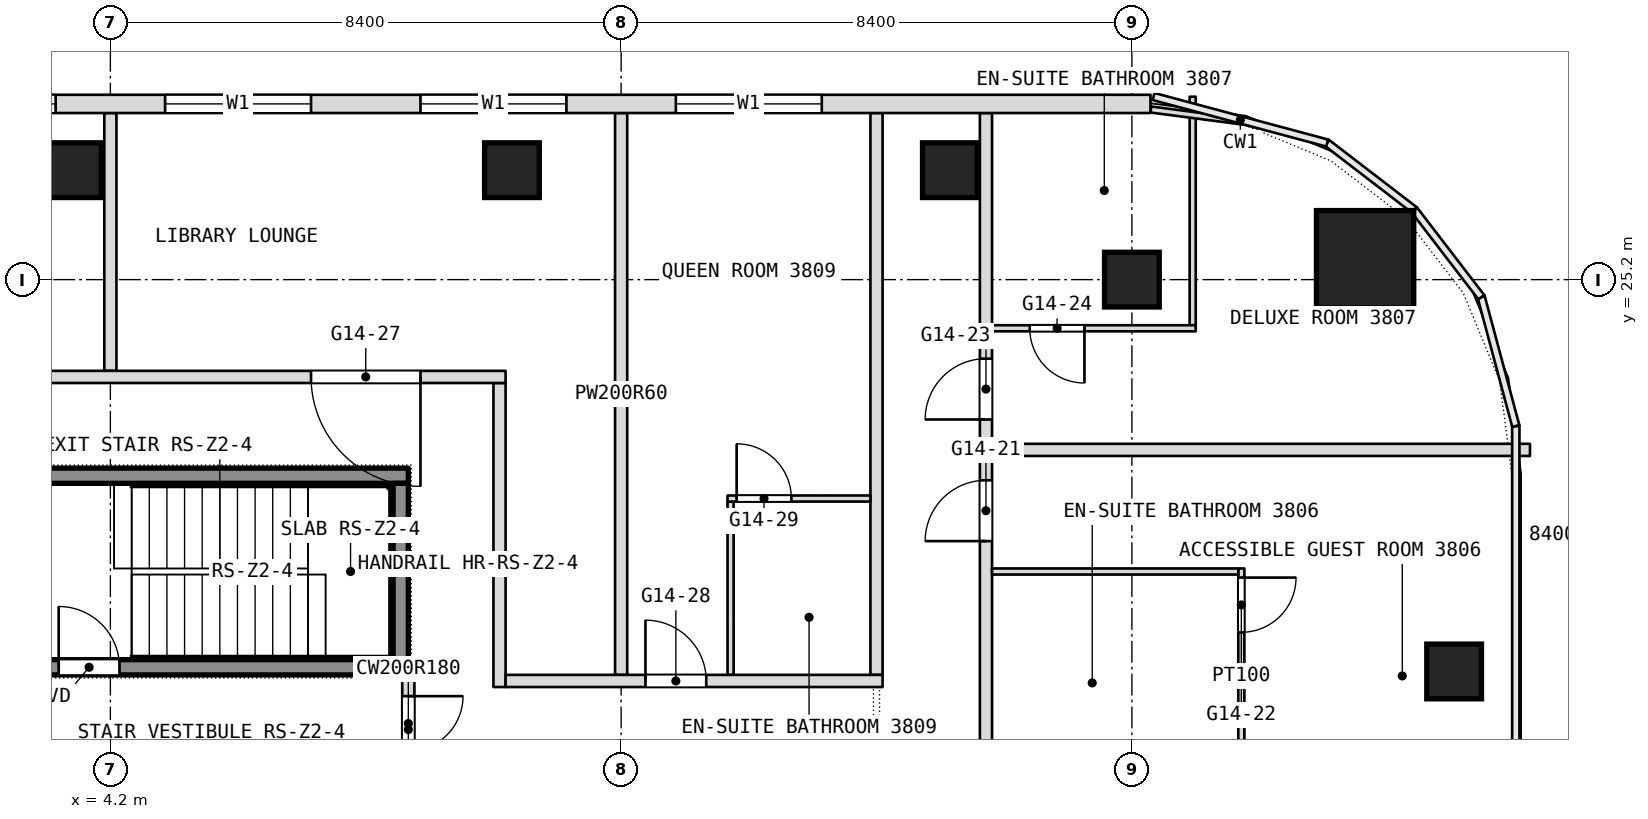
"""IFC4 building model, lengths in metres.
Left out: names, types, materials, properties, quantities, classifications, styles, units other than length and angle.
Written with IfcOpenShell. Run it as: python <this file> out.ifc"""

import sys

from ifc_helpers import new_model, si_unit, direction, frame, frame_2d, origin, origin_2d, place, context, subcontext, project, spatial, rectangle, extrude, element, fill, save


model = new_model("IFC4")
c1 = context("Model", 3, precision=1e-05, world=origin(), true_north=direction((0.0, 1.0)))
c2 = subcontext(c1, "Body", "Model", "MODEL_VIEW")
j1 = project(units=[si_unit("LENGTHUNIT", "METRE"), si_unit("PLANEANGLEUNIT", "RADIAN")], contexts=[c1])
p1 = place(None, origin())
s1 = spatial("IfcSite", under=j1, at=p1, CompositionType="ELEMENT")
p2 = place(p1, origin())
s2 = spatial("IfcBuilding", under=s1, at=p2, CompositionType="ELEMENT")
p3 = place(p2, frame((0.0, 0.0, 162.5)))
s3 = spatial("IfcBuildingStorey", under=s2, at=p3, CompositionType="ELEMENT", Elevation=162.5)
p4 = place(p3, frame((24.835, 25.535, 0.0), z_axis=(0.0, 0.0, 1.0), x_axis=(1.0, 0.0, 0.0)))
e1 = element("IfcColumn", 1, at=p4, inside=s3, PredefinedType="COLUMN", context=c2, shape_type="SweptSolid", body=[
    extrude(rectangle(XDim=1.6, YDim=1.6, at=origin_2d()), origin(), (0.0, 0.0, 1.0), 3.6),
])
for number, where, z_axis, x_axis in (
    (2, (21.0, 25.2, 0.0), (0.0, 0.0, 1.0), (1.0, 0.0, 0.0)),
    (3, (3.601, 27.0, 0.0), (0.0, 0.0, 1.0), (1.0, 0.0, 0.0)),
    (4, (10.804, 27.0, 0.0), (0.0, 0.0, 1.0), (1.0, 0.0, 0.0)),
    (5, (18.007, 27.0, 0.0), (0.0, 0.0, 1.0), (1.0, 0.0, 0.0)),
    (6, (26.3, 18.756, 0.0), (0.0, 0.0, 1.0), (1.0, 0.0, 0.0)),
):
    element("IfcColumn", number, at=place(p3, frame(where, z_axis=z_axis, x_axis=x_axis)), inside=s3, PredefinedType="COLUMN", context=c2, shape_type="SweptSolid", body=[
        extrude(rectangle(XDim=0.9, YDim=0.9, at=origin_2d()), origin(), (0.0, 0.0, 1.0), 3.6),
    ])
p5 = place(p3, frame((22.8, 16.9, 0.0), z_axis=(0.0, 0.0, 1.0), x_axis=(0.0, 1.0, 0.0)))
e7 = element("IfcWall", 7, at=p5, inside=s3, PredefinedType="PARTITIONING", context=c2, shape_type="SweptSolid", body=[
    extrude(rectangle(XDim=3.55, YDim=0.1, at=frame_2d((1.775, 0.0))), origin(), (0.0, 0.0, 1.0), 3.34),
])
p6 = place(p5, frame((2.5, 0.0, 0.0)))
e8 = element("IfcOpeningElement", 8, at=p6, cuts=e7, PredefinedType="OPENING", context=c2, shape_type="SweptSolid", body=[
    extrude(rectangle(XDim=0.9, YDim=2.1, at=frame_2d((0.45, 1.05))), frame((0.0, 0.05, 0.0), z_axis=(0.0, -1.0, 0.0), x_axis=(1.0, 0.0, 0.0)), (0.0, 0.0, 1.0), 0.1),
])
p7 = place(p3, frame((22.0, 24.45, 0.0), z_axis=(0.0, 0.0, 1.0), x_axis=(0.0, 1.0, 0.0)))
e9 = element("IfcWall", 9, at=p7, inside=s3, PredefinedType="PARTITIONING", context=c2, shape_type="SweptSolid", body=[
    extrude(rectangle(XDim=3.758, YDim=0.1, at=frame_2d((1.879, 0.0))), origin(), (0.0, 0.0, 1.0), 3.34),
])
p8 = place(p3, frame((18.6, -21.708, 0.0), z_axis=(0.0, 0.0, 1.0), x_axis=(0.0, 1.0, 0.0)))
e10 = element("IfcWall", 10, at=p8, inside=s3, PredefinedType="PARTITIONING", context=c2, shape_type="SweptSolid", body=[
    extrude(rectangle(XDim=49.648, YDim=0.2, at=frame_2d((24.824, 0.0))), origin(), (0.0, 0.0, 1.0), 3.34),
])
p9 = place(p8, frame((2.204, 0.0, 0.0)))
e11 = element("IfcOpeningElement", 11, at=p9, cuts=e10, PredefinedType="OPENING", context=c2, shape_type="SweptSolid", body=[
    extrude(rectangle(XDim=0.9, YDim=2.1, at=frame_2d((0.45, 1.05))), frame((0.0, 0.1, 0.0), z_axis=(0.0, -1.0, 0.0), x_axis=(1.0, 0.0, 0.0)), (0.0, 0.0, 1.0), 0.2),
])
p10 = place(p8, frame((8.608, 0.0, 0.0)))
e12 = element("IfcOpeningElement", 12, at=p10, cuts=e10, PredefinedType="OPENING", context=c2, shape_type="SweptSolid", body=[
    extrude(rectangle(XDim=1.1, YDim=2.1, at=frame_2d((0.55, 1.05))), frame((0.0, 0.1, 0.0), z_axis=(0.0, -1.0, 0.0), x_axis=(1.0, 0.0, 0.0)), (0.0, 0.0, 1.0), 0.2),
])
p11 = place(p8, frame((16.608, 0.0, 0.0)))
e13 = element("IfcOpeningElement", 13, at=p11, cuts=e10, PredefinedType="OPENING", context=c2, shape_type="SweptSolid", body=[
    extrude(rectangle(XDim=1.8, YDim=2.1, at=frame_2d((0.9, 1.05))), frame((0.0, 0.1, 0.0), z_axis=(0.0, -1.0, 0.0), x_axis=(1.0, 0.0, 0.0)), (0.0, 0.0, 1.0), 0.2),
])
p12 = place(p8, frame((27.458, 0.0, 0.0)))
e14 = element("IfcOpeningElement", 14, at=p12, cuts=e10, PredefinedType="OPENING", context=c2, shape_type="SweptSolid", body=[
    extrude(rectangle(XDim=1.1, YDim=2.1, at=frame_2d((0.55, 1.05))), frame((0.0, 0.1, 0.0), z_axis=(0.0, -1.0, 0.0), x_axis=(1.0, 0.0, 0.0)), (0.0, 0.0, 1.0), 0.2),
])
p13 = place(p8, frame((30.508, 0.0, 0.0)))
e15 = element("IfcOpeningElement", 15, at=p13, cuts=e10, PredefinedType="OPENING", context=c2, shape_type="SweptSolid", body=[
    extrude(rectangle(XDim=1.0, YDim=2.1, at=frame_2d((0.5, 1.05))), frame((0.0, 0.1, 0.0), z_axis=(0.0, -1.0, 0.0), x_axis=(1.0, 0.0, 0.0)), (0.0, 0.0, 1.0), 0.2),
])
p14 = place(p8, frame((37.108, 0.0, 0.0)))
e16 = element("IfcOpeningElement", 16, at=p14, cuts=e10, PredefinedType="OPENING", context=c2, shape_type="SweptSolid", body=[
    extrude(rectangle(XDim=1.0, YDim=2.1, at=frame_2d((0.5, 1.05))), frame((0.0, 0.1, 0.0), z_axis=(0.0, -1.0, 0.0), x_axis=(1.0, 0.0, 0.0)), (0.0, 0.0, 1.0), 0.2),
])
p15 = place(p8, frame((42.608, 0.0, 0.0)))
e17 = element("IfcOpeningElement", 17, at=p15, cuts=e10, PredefinedType="OPENING", context=c2, shape_type="SweptSolid", body=[
    extrude(rectangle(XDim=1.0, YDim=2.1, at=frame_2d((0.5, 1.05))), frame((0.0, 0.1, 0.0), z_axis=(0.0, -1.0, 0.0), x_axis=(1.0, 0.0, 0.0)), (0.0, 0.0, 1.0), 0.2),
])
p16 = place(p8, frame((44.608, 0.0, 0.0)))
e18 = element("IfcOpeningElement", 18, at=p16, cuts=e10, PredefinedType="OPENING", context=c2, shape_type="SweptSolid", body=[
    extrude(rectangle(XDim=1.0, YDim=2.1, at=frame_2d((0.5, 1.05))), frame((0.0, 0.1, 0.0), z_axis=(0.0, -1.0, 0.0), x_axis=(1.0, 0.0, 0.0)), (0.0, 0.0, 1.0), 0.2),
])
p17 = place(p3, frame((16.8, 18.7, 0.0), z_axis=(0.0, 0.0, 1.0), x_axis=(0.0, 1.0, 0.0)))
e19 = element("IfcWall", 19, at=p17, inside=s3, PredefinedType="PARTITIONING", context=c2, shape_type="SweptSolid", body=[
    extrude(rectangle(XDim=9.24, YDim=0.2, at=frame_2d((4.62, 0.0))), origin(), (0.0, 0.0, 1.0), 3.34),
])
p18 = place(p3, frame((14.4, 18.7, 0.0), z_axis=(0.0, 0.0, 1.0), x_axis=(0.0, 1.0, 0.0)))
e20 = element("IfcWall", 20, at=p18, inside=s3, PredefinedType="PARTITIONING", context=c2, shape_type="SweptSolid", body=[
    extrude(rectangle(XDim=2.85, YDim=0.1, at=frame_2d((1.425, 0.0))), origin(), (0.0, 0.0, 1.0), 3.34),
])
p19 = place(p3, frame((12.6, 18.7, 0.0), z_axis=(0.0, 0.0, 1.0), x_axis=(0.0, 1.0, 0.0)))
e21 = element("IfcWall", 21, at=p19, inside=s3, PredefinedType="PARTITIONING", context=c2, shape_type="SweptSolid", body=[
    extrude(rectangle(XDim=9.24, YDim=0.2, at=frame_2d((4.62, 0.0))), origin(), (0.0, 0.0, 1.0), 3.34),
])
p20 = place(p3, frame((10.6, 18.5, 0.0), z_axis=(0.0, 0.0, 1.0), x_axis=(0.0, 1.0, 0.0)))
e22 = element("IfcWall", 22, at=p20, inside=s3, PredefinedType="PARTITIONING", context=c2, shape_type="SweptSolid", body=[
    extrude(rectangle(XDim=5.0, YDim=0.2, at=frame_2d((2.5, 0.0))), origin(), (0.0, 0.0, 1.0), 3.34),
])
p21 = place(p3, frame((9.1, 16.9, 0.0), z_axis=(0.0, 0.0, 1.0), x_axis=(0.0, 1.0, 0.0)))
e23 = element("IfcWall", 23, at=p21, inside=s3, PredefinedType="PARTITIONING", context=c2, shape_type="SweptSolid", body=[
    extrude(rectangle(XDim=1.8, YDim=0.2, at=frame_2d((0.9, 0.0))), origin(), (0.0, 0.0, 1.0), 3.34),
])
p22 = place(p21, frame((0.55, 0.0, 0.0)))
e24 = element("IfcOpeningElement", 24, at=p22, cuts=e23, PredefinedType="OPENING", context=c2, shape_type="SweptSolid", body=[
    extrude(rectangle(XDim=0.9, YDim=2.1, at=frame_2d((0.45, 1.05))), frame((0.0, 0.1, 0.0), z_axis=(0.0, -1.0, 0.0), x_axis=(1.0, 0.0, 0.0)), (0.0, 0.0, 1.0), 0.2),
])
p23 = place(p3, frame((4.2, 23.7, 0.0), z_axis=(0.0, 0.0, 1.0), x_axis=(0.0, 1.0, 0.0)))
e25 = element("IfcWall", 25, at=p23, inside=s3, PredefinedType="PARTITIONING", context=c2, shape_type="SweptSolid", body=[
    extrude(rectangle(XDim=4.24, YDim=0.2, at=frame_2d((2.12, 0.0))), origin(), (0.0, 0.0, 1.0), 3.34),
])
p24 = place(p3, frame((10.7, 18.6, 0.0), z_axis=(0.0, 0.0, 1.0), x_axis=(1.0, 0.0, 0.0)))
e26 = element("IfcWall", 26, at=p24, inside=s3, PredefinedType="PARTITIONING", context=c2, shape_type="SweptSolid", body=[
    extrude(rectangle(XDim=6.2, YDim=0.2, at=frame_2d((3.1, 0.0))), origin(), (0.0, 0.0, 1.0), 3.34),
])
p25 = place(p24, frame((2.3, 0.0, 0.0)))
e27 = element("IfcOpeningElement", 27, at=p25, cuts=e26, PredefinedType="OPENING", context=c2, shape_type="SweptSolid", body=[
    extrude(rectangle(XDim=1.0, YDim=2.1, at=frame_2d((0.5, 1.05))), frame((0.0, 0.1, 0.0), z_axis=(0.0, -1.0, 0.0), x_axis=(1.0, 0.0, 0.0)), (0.0, 0.0, 1.0), 0.2),
])
p26 = place(p3, frame((18.7, 20.4, 0.0), z_axis=(0.0, 0.0, 1.0), x_axis=(1.0, 0.0, 0.0)))
e28 = element("IfcWall", 28, at=p26, inside=s3, PredefinedType="PARTITIONING", context=c2, shape_type="SweptSolid", body=[
    extrude(rectangle(XDim=4.05, YDim=0.1, at=frame_2d((2.025, 0.0))), origin(), (0.0, 0.0, 1.0), 3.34),
])
p27 = place(p3, frame((14.35, 21.6, 0.0), z_axis=(0.0, 0.0, 1.0), x_axis=(1.0, 0.0, 0.0)))
e29 = element("IfcWall", 29, at=p27, inside=s3, PredefinedType="PARTITIONING", context=c2, shape_type="SweptSolid", body=[
    extrude(rectangle(XDim=2.35, YDim=0.1, at=frame_2d((1.175, 0.0))), origin(), (0.0, 0.0, 1.0), 3.34),
])
p28 = place(p27, frame((0.15, 0.0, 0.0)))
e30 = element("IfcOpeningElement", 30, at=p28, cuts=e29, PredefinedType="OPENING", context=c2, shape_type="SweptSolid", body=[
    extrude(rectangle(XDim=0.9, YDim=2.1, at=frame_2d((0.45, 1.05))), frame((0.0, 0.05, 0.0), z_axis=(0.0, -1.0, 0.0), x_axis=(1.0, 0.0, 0.0)), (0.0, 0.0, 1.0), 0.1),
])
p29 = place(p3, frame((18.7, 22.4, 0.0), z_axis=(0.0, 0.0, 1.0), x_axis=(1.0, 0.0, 0.0)))
e31 = element("IfcWall", 31, at=p29, inside=s3, PredefinedType="PARTITIONING", context=c2, shape_type="SweptSolid", body=[
    extrude(rectangle(XDim=8.847, YDim=0.2, at=frame_2d((4.424, 0.0))), origin(), (0.0, 0.0, 1.0), 3.34),
])
p30 = place(p3, frame((1.5, 23.6, 0.0), z_axis=(0.0, 0.0, 1.0), x_axis=(1.0, 0.0, 0.0)))
e32 = element("IfcWall", 32, at=p30, inside=s3, PredefinedType="PARTITIONING", context=c2, shape_type="SweptSolid", body=[
    extrude(rectangle(XDim=9.2, YDim=0.2, at=frame_2d((4.6, 0.0))), origin(), (0.0, 0.0, 1.0), 3.34),
])
p31 = place(p30, frame((6.0, 0.0, 0.0)))
e33 = element("IfcOpeningElement", 33, at=p31, cuts=e32, PredefinedType="OPENING", context=c2, shape_type="SweptSolid", body=[
    extrude(rectangle(XDim=1.8, YDim=2.1, at=frame_2d((0.9, 1.05))), frame((0.0, 0.1, 0.0), z_axis=(0.0, -1.0, 0.0), x_axis=(1.0, 0.0, 0.0)), (0.0, 0.0, 1.0), 0.2),
])
p32 = place(p3, frame((18.7, 24.4, 0.0), z_axis=(0.0, 0.0, 1.0), x_axis=(1.0, 0.0, 0.0)))
e34 = element("IfcWall", 34, at=p32, inside=s3, PredefinedType="PARTITIONING", context=c2, shape_type="SweptSolid", body=[
    extrude(rectangle(XDim=3.35, YDim=0.1, at=frame_2d((1.675, 0.0))), origin(), (0.0, 0.0, 1.0), 3.34),
])
p33 = place(p32, frame((0.62, 0.0, 0.0)))
e35 = element("IfcOpeningElement", 35, at=p33, cuts=e34, PredefinedType="OPENING", context=c2, shape_type="SweptSolid", body=[
    extrude(rectangle(XDim=0.9, YDim=2.1, at=frame_2d((0.45, 1.05))), frame((0.0, 0.05, 0.0), z_axis=(0.0, -1.0, 0.0), x_axis=(1.0, 0.0, 0.0)), (0.0, 0.0, 1.0), 0.1),
])
p34 = place(p3, frame((21.312, 27.998, 0.0), z_axis=(0.0, 0.0, 1.0), x_axis=(0.991547575144, -0.129743617284, 0.0)))
e36 = element("IfcWall", 36, at=p34, inside=s3, PredefinedType="PARTITIONING", context=c2, shape_type="SweptSolid", body=[
    extrude(rectangle(XDim=1.626, YDim=0.1, at=frame_2d((0.813, 0.0))), origin(), (0.0, 0.0, 1.0), 3.34),
])
p35 = place(p3, frame((21.306, 28.09, 0.0), z_axis=(0.0, 0.0, 1.0), x_axis=(-1.0, 0.0, 0.0)))
e37 = element("IfcWall", 37, at=p35, inside=s3, PredefinedType="NOTDEFINED", context=c2, shape_type="SweptSolid", body=[
    extrude(rectangle(XDim=42.612, YDim=0.3, at=frame_2d((21.306, 0.0))), origin(), (0.0, 0.0, 1.0), 3.6),
])
p36 = place(p35, frame((5.406, 0.0, 0.9)))
e38 = element("IfcOpeningElement", 38, at=p36, cuts=e37, PredefinedType="OPENING", context=c2, shape_type="SweptSolid", body=[
    extrude(rectangle(XDim=2.4, YDim=2.1, at=frame_2d((1.2, 1.05))), frame((0.0, 0.15, 0.0), z_axis=(0.0, -1.0, 0.0), x_axis=(1.0, 0.0, 0.0)), (0.0, 0.0, 1.0), 0.3),
])
p37 = place(p35, frame((9.606, 0.0, 0.9)))
e39 = element("IfcOpeningElement", 39, at=p37, cuts=e37, PredefinedType="OPENING", context=c2, shape_type="SweptSolid", body=[
    extrude(rectangle(XDim=2.4, YDim=2.1, at=frame_2d((1.2, 1.05))), frame((0.0, 0.15, 0.0), z_axis=(0.0, -1.0, 0.0), x_axis=(1.0, 0.0, 0.0)), (0.0, 0.0, 1.0), 0.3),
])
p38 = place(p35, frame((13.806, 0.0, 0.9)))
e40 = element("IfcOpeningElement", 40, at=p38, cuts=e37, PredefinedType="OPENING", context=c2, shape_type="SweptSolid", body=[
    extrude(rectangle(XDim=2.4, YDim=2.1, at=frame_2d((1.2, 1.05))), frame((0.0, 0.15, 0.0), z_axis=(0.0, -1.0, 0.0), x_axis=(1.0, 0.0, 0.0)), (0.0, 0.0, 1.0), 0.3),
])
p39 = place(p35, frame((18.006, 0.0, 0.9)))
e41 = element("IfcOpeningElement", 41, at=p39, cuts=e37, PredefinedType="OPENING", context=c2, shape_type="SweptSolid", body=[
    extrude(rectangle(XDim=2.4, YDim=2.1, at=frame_2d((1.2, 1.05))), frame((0.0, 0.15, 0.0), z_axis=(0.0, -1.0, 0.0), x_axis=(1.0, 0.0, 0.0)), (0.0, 0.0, 1.0), 0.3),
])
p40 = place(p35, frame((22.206, 0.0, 0.9)))
e42 = element("IfcOpeningElement", 42, at=p40, cuts=e37, PredefinedType="OPENING", context=c2, shape_type="SweptSolid", body=[
    extrude(rectangle(XDim=2.4, YDim=2.1, at=frame_2d((1.2, 1.05))), frame((0.0, 0.15, 0.0), z_axis=(0.0, -1.0, 0.0), x_axis=(1.0, 0.0, 0.0)), (0.0, 0.0, 1.0), 0.3),
])
p41 = place(p35, frame((26.406, 0.0, 0.9)))
e43 = element("IfcOpeningElement", 43, at=p41, cuts=e37, PredefinedType="OPENING", context=c2, shape_type="SweptSolid", body=[
    extrude(rectangle(XDim=2.4, YDim=2.1, at=frame_2d((1.2, 1.05))), frame((0.0, 0.15, 0.0), z_axis=(0.0, -1.0, 0.0), x_axis=(1.0, 0.0, 0.0)), (0.0, 0.0, 1.0), 0.3),
])
p42 = place(p35, frame((30.606, 0.0, 0.9)))
e44 = element("IfcOpeningElement", 44, at=p42, cuts=e37, PredefinedType="OPENING", context=c2, shape_type="SweptSolid", body=[
    extrude(rectangle(XDim=2.4, YDim=2.1, at=frame_2d((1.2, 1.05))), frame((0.0, 0.15, 0.0), z_axis=(0.0, -1.0, 0.0), x_axis=(1.0, 0.0, 0.0)), (0.0, 0.0, 1.0), 0.3),
])
p43 = place(p35, frame((34.806, 0.0, 0.9)))
e45 = element("IfcOpeningElement", 45, at=p43, cuts=e37, PredefinedType="OPENING", context=c2, shape_type="SweptSolid", body=[
    extrude(rectangle(XDim=2.4, YDim=2.1, at=frame_2d((1.2, 1.05))), frame((0.0, 0.15, 0.0), z_axis=(0.0, -1.0, 0.0), x_axis=(1.0, 0.0, 0.0)), (0.0, 0.0, 1.0), 0.3),
])
p44 = place(p3, frame((2.9, 18.825, 0.1), z_axis=(0.0, 0.0, 1.0), x_axis=(1.0, 0.0, 0.0)))
e46 = element("IfcWall", 46, at=p44, inside=s3, PredefinedType="SHEAR", context=c2, shape_type="SweptSolid", body=[
    extrude(rectangle(XDim=6.2, YDim=0.25, at=frame_2d((3.1, 0.0))), origin(), (0.0, 0.0, 1.0), 3.6),
])
p45 = place(p44, frame((0.45, 0.0, 0.0)))
e47 = element("IfcOpeningElement", 47, at=p45, cuts=e46, PredefinedType="OPENING", context=c2, shape_type="SweptSolid", body=[
    extrude(rectangle(XDim=1.0, YDim=2.1, at=frame_2d((0.5, 1.05))), frame((0.0, 0.125, 0.0), z_axis=(0.0, -1.0, 0.0), x_axis=(1.0, 0.0, 0.0)), (0.0, 0.0, 1.0), 0.25),
])
p46 = place(p3, frame((2.9, 21.975, 0.1), z_axis=(0.0, 0.0, 1.0), x_axis=(1.0, 0.0, 0.0)))
e48 = element("IfcWall", 48, at=p46, inside=s3, PredefinedType="SHEAR", context=c2, shape_type="SweptSolid", body=[
    extrude(rectangle(XDim=6.2, YDim=0.25, at=frame_2d((3.1, 0.0))), origin(), (0.0, 0.0, 1.0), 3.6),
])
p47 = place(p3, frame((8.975, 18.95, 0.1), z_axis=(0.0, 0.0, 1.0), x_axis=(0.0, 1.0, 0.0)))
e49 = element("IfcWall", 49, at=p47, inside=s3, PredefinedType="SHEAR", context=c2, shape_type="SweptSolid", body=[
    extrude(rectangle(XDim=2.9, YDim=0.25, at=frame_2d((1.45, 0.0))), origin(), (0.0, 0.0, 1.0), 3.6),
])
p48 = place(p6, origin())
e50 = element("IfcDoor", 50, at=p48, inside=s3, OperationType="SINGLE_SWING_RIGHT", PredefinedType="DOOR", context=c2, shape_type="SweptSolid", body=[
    extrude(rectangle(XDim=0.9, YDim=2.1, at=frame_2d((0.45, 1.05))), frame((0.0, 0.025, 0.0), z_axis=(0.0, -1.0, 0.0), x_axis=(1.0, 0.0, 0.0)), (0.0, 0.0, 1.0), 0.05),
])
fill(e8, e50)
p49 = place(p15, origin())
e51 = element("IfcDoor", 51, at=p49, inside=s3, OperationType="SINGLE_SWING_LEFT", PredefinedType="DOOR", context=c2, shape_type="SweptSolid", body=[
    extrude(rectangle(XDim=1.0, YDim=2.1, at=frame_2d((0.5, 1.05))), frame((0.0, 0.025, 0.0), z_axis=(0.0, -1.0, 0.0), x_axis=(1.0, 0.0, 0.0)), (0.0, 0.0, 1.0), 0.05),
])
fill(e17, e51)
p50 = place(p16, origin())
e52 = element("IfcDoor", 52, at=p50, inside=s3, OperationType="SINGLE_SWING_LEFT", PredefinedType="DOOR", context=c2, shape_type="SweptSolid", body=[
    extrude(rectangle(XDim=1.0, YDim=2.1, at=frame_2d((0.5, 1.05))), frame((0.0, 0.025, 0.0), z_axis=(0.0, -1.0, 0.0), x_axis=(1.0, 0.0, 0.0)), (0.0, 0.0, 1.0), 0.05),
])
fill(e18, e52)
p51 = place(p22, origin())
e53 = element("IfcDoor", 53, at=p51, inside=s3, OperationType="SINGLE_SWING_RIGHT", PredefinedType="DOOR", context=c2, shape_type="SweptSolid", body=[
    extrude(rectangle(XDim=0.9, YDim=2.1, at=frame_2d((0.45, 1.05))), frame((0.0, 0.025, 0.0), z_axis=(0.0, -1.0, 0.0), x_axis=(1.0, 0.0, 0.0)), (0.0, 0.0, 1.0), 0.05),
])
fill(e24, e53)
p52 = place(p25, origin())
e54 = element("IfcDoor", 54, at=p52, inside=s3, OperationType="SINGLE_SWING_LEFT", PredefinedType="DOOR", context=c2, shape_type="SweptSolid", body=[
    extrude(rectangle(XDim=1.0, YDim=2.1, at=frame_2d((0.5, 1.05))), frame((0.0, 0.025, 0.0), z_axis=(0.0, -1.0, 0.0), x_axis=(1.0, 0.0, 0.0)), (0.0, 0.0, 1.0), 0.05),
])
fill(e27, e54)
p53 = place(p28, origin())
e55 = element("IfcDoor", 55, at=p53, inside=s3, OperationType="SINGLE_SWING_RIGHT", PredefinedType="DOOR", context=c2, shape_type="SweptSolid", body=[
    extrude(rectangle(XDim=0.9, YDim=2.1, at=frame_2d((0.45, 1.05))), frame((0.0, 0.025, 0.0), z_axis=(0.0, -1.0, 0.0), x_axis=(1.0, 0.0, 0.0)), (0.0, 0.0, 1.0), 0.05),
])
fill(e30, e55)
p54 = place(p31, origin())
e56 = element("IfcDoor", 56, at=p54, inside=s3, OperationType="DOUBLE_DOOR_SINGLE_SWING", PredefinedType="DOOR", context=c2, shape_type="SweptSolid", body=[
    extrude(rectangle(XDim=1.8, YDim=2.1, at=frame_2d((0.9, 1.05))), frame((0.0, 0.025, 0.0), z_axis=(0.0, -1.0, 0.0), x_axis=(1.0, 0.0, 0.0)), (0.0, 0.0, 1.0), 0.05),
])
fill(e33, e56)
p55 = place(p33, origin())
e57 = element("IfcDoor", 57, at=p55, inside=s3, OperationType="SINGLE_SWING_RIGHT", PredefinedType="DOOR", context=c2, shape_type="SweptSolid", body=[
    extrude(rectangle(XDim=0.9, YDim=2.1, at=frame_2d((0.45, 1.05))), frame((0.0, 0.025, 0.0), z_axis=(0.0, -1.0, 0.0), x_axis=(1.0, 0.0, 0.0)), (0.0, 0.0, 1.0), 0.05),
])
fill(e35, e57)
p56 = place(p36, origin())
e58 = element("IfcWindow", 58, at=p56, inside=s3, PartitioningType="SINGLE_PANEL", PredefinedType="WINDOW", context=c2, shape_type="SweptSolid", body=[
    extrude(rectangle(XDim=2.4, YDim=2.1, at=frame_2d((1.2, 1.05))), frame((0.0, 0.03, 0.0), z_axis=(0.0, -1.0, 0.0), x_axis=(1.0, 0.0, 0.0)), (0.0, 0.0, 1.0), 0.06),
])
fill(e38, e58)
p57 = place(p37, origin())
e59 = element("IfcWindow", 59, at=p57, inside=s3, PartitioningType="SINGLE_PANEL", PredefinedType="WINDOW", context=c2, shape_type="SweptSolid", body=[
    extrude(rectangle(XDim=2.4, YDim=2.1, at=frame_2d((1.2, 1.05))), frame((0.0, 0.03, 0.0), z_axis=(0.0, -1.0, 0.0), x_axis=(1.0, 0.0, 0.0)), (0.0, 0.0, 1.0), 0.06),
])
fill(e39, e59)
p58 = place(p38, origin())
e60 = element("IfcWindow", 60, at=p58, inside=s3, PartitioningType="SINGLE_PANEL", PredefinedType="WINDOW", context=c2, shape_type="SweptSolid", body=[
    extrude(rectangle(XDim=2.4, YDim=2.1, at=frame_2d((1.2, 1.05))), frame((0.0, 0.03, 0.0), z_axis=(0.0, -1.0, 0.0), x_axis=(1.0, 0.0, 0.0)), (0.0, 0.0, 1.0), 0.06),
])
fill(e40, e60)
p59 = place(p39, origin())
e61 = element("IfcWindow", 61, at=p59, inside=s3, PartitioningType="SINGLE_PANEL", PredefinedType="WINDOW", context=c2, shape_type="SweptSolid", body=[
    extrude(rectangle(XDim=2.4, YDim=2.1, at=frame_2d((1.2, 1.05))), frame((0.0, 0.03, 0.0), z_axis=(0.0, -1.0, 0.0), x_axis=(1.0, 0.0, 0.0)), (0.0, 0.0, 1.0), 0.06),
])
fill(e41, e61)
p60 = place(p45, origin())
e62 = element("IfcDoor", 62, at=p60, inside=s3, OperationType="SINGLE_SWING_LEFT", PredefinedType="DOOR", context=c2, shape_type="SweptSolid", body=[
    extrude(rectangle(XDim=1.0, YDim=2.1, at=frame_2d((0.5, 1.05))), frame((0.0, 0.025, 0.0), z_axis=(0.0, -1.0, 0.0), x_axis=(1.0, 0.0, 0.0)), (0.0, 0.0, 1.0), 0.05),
])
fill(e47, e62)
save(model, sys.argv[1])
